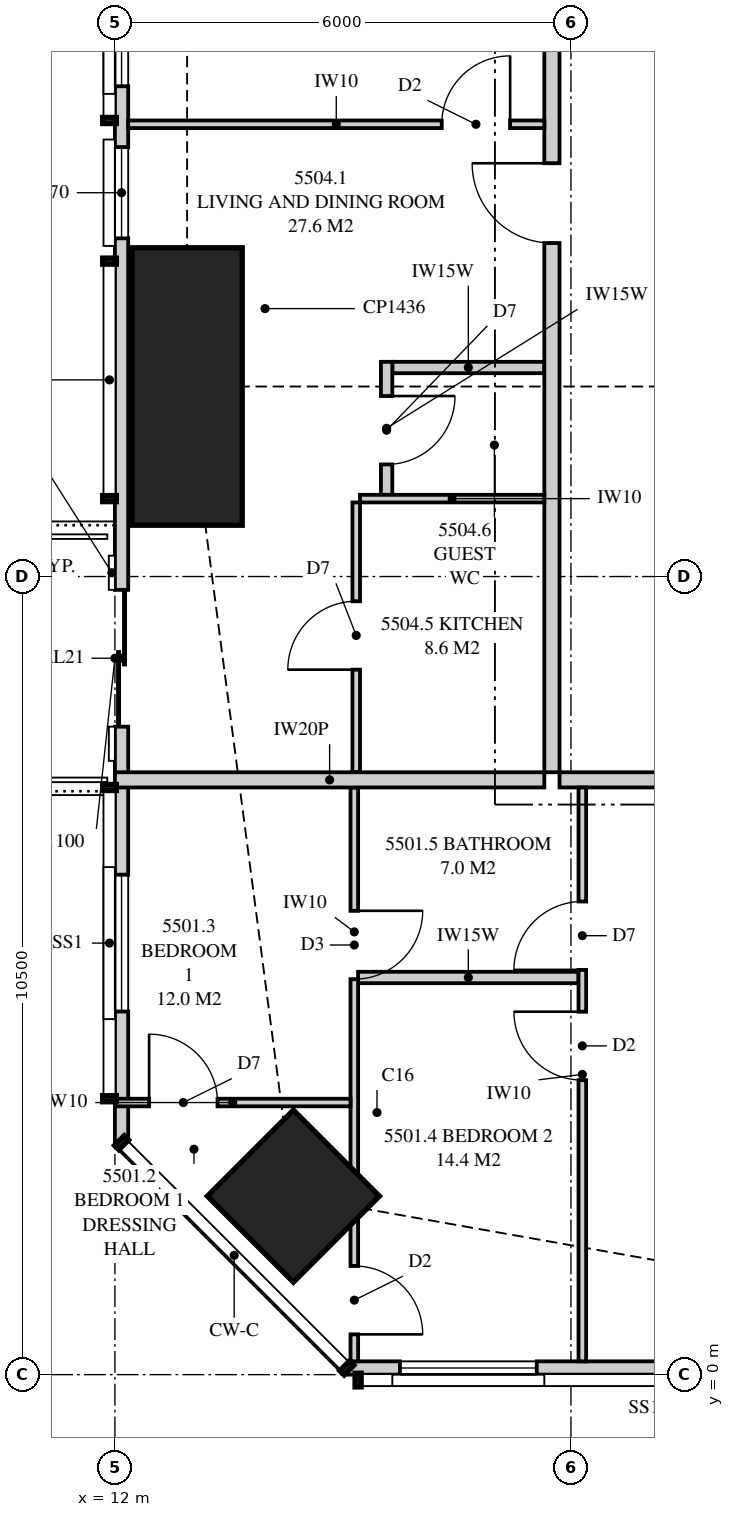
"""IFC4 building model, lengths in metres.
Left out: names, types, materials, properties, quantities, classifications, styles, units other than length and angle.
Written with IfcOpenShell. Run it as: python <this file> out.ifc"""

import sys

from ifc_helpers import new_model, si_unit, direction, frame, frame_2d, origin, origin_2d, place, context, subcontext, project, spatial, polyline, rectangle, outline, extrude, element, fill, save


model = new_model("IFC4")
c1 = context("Model", 3, precision=1e-05, world=origin(), true_north=direction((0.0, 1.0)))
c2 = subcontext(c1, "Body", "Model", "MODEL_VIEW")
j1 = project(units=[si_unit("LENGTHUNIT", "METRE"), si_unit("PLANEANGLEUNIT", "RADIAN")], contexts=[c1])
p1 = place(None, origin())
s1 = spatial("IfcSite", under=j1, at=p1, CompositionType="ELEMENT")
p2 = place(p1, origin())
s2 = spatial("IfcBuilding", under=s1, at=p2, CompositionType="ELEMENT")
p3 = place(p2, frame((0.0, 0.0, 201.25)))
s3 = spatial("IfcBuildingStorey", under=s2, at=p3, CompositionType="ELEMENT", Elevation=201.25)
p4 = place(p3, frame((14.348, 2.348, 0.0), z_axis=(0.0, 0.0, 1.0), x_axis=(0.707106781187, 0.707106781187, 0.0)))
e1 = element("IfcColumn", 1, at=p4, inside=s3, PredefinedType="COLUMN", context=c2, shape_type="SweptSolid", body=[
    extrude(rectangle(XDim=1.6, YDim=1.6, at=origin_2d()), origin(), (0.0, 0.0, 1.0), 3.35),
])
p5 = place(p3, frame((12.95, 13.0, 0.0), z_axis=(0.0, 0.0, 1.0), x_axis=(1.0, 0.0, 0.0)))
e2 = element("IfcColumn", 2, at=p5, inside=s3, PredefinedType="COLUMN", context=c2, shape_type="SweptSolid", body=[
    extrude(rectangle(XDim=1.45, YDim=3.65, at=origin_2d()), origin(), (0.0, 0.0, 1.0), 3.35),
])
p6 = place(p3, frame((15.051, 0.087, 0.0), z_axis=(0.0, 0.0, 1.0), x_axis=(1.0, 0.0, 0.0)))
e3 = element("IfcWall", 3, at=p6, inside=s3, PredefinedType="SOLIDWALL", context=c2, shape_type="SweptSolid", body=[
    extrude(outline(polyline([(0.0, 0.0), (34.897, 0.0), (34.897, 3.11), (27.91, 3.11), (27.91, 2.15), (27.836, 2.15), (27.836, 3.11), (27.699, 3.11), (27.699, 2.15), (7.199, 2.15), (7.199, 3.11), (7.062, 3.11), (7.062, 2.15), (6.987, 2.15), (6.987, 3.11), (0.0, 3.11), (0.0, 0.0)])), frame((0.0, 0.087, 0.0), z_axis=(0.0, -1.0, 0.0), x_axis=(1.0, 0.0, 0.0)), (0.0, 0.0, 1.0), 0.175),
])
p7 = place(p6, frame((0.699, 0.0, 0.4)))
e4 = element("IfcOpeningElement", 4, at=p7, cuts=e3, PredefinedType="OPENING", context=c2, shape_type="SweptSolid", body=[
    extrude(rectangle(XDim=1.8, YDim=1.7, at=frame_2d((0.9, 0.85))), frame((0.0, 0.097, 0.0), z_axis=(0.0, -1.0, 0.0), x_axis=(1.0, 0.0, 0.0)), (0.0, 0.0, 1.0), 0.195),
])
p8 = place(p6, frame((9.274, 0.0, 0.4)))
e5 = element("IfcOpeningElement", 5, at=p8, cuts=e3, PredefinedType="OPENING", context=c2, shape_type="SweptSolid", body=[
    extrude(rectangle(XDim=2.4, YDim=1.7, at=frame_2d((1.2, 0.85))), frame((0.0, 0.097, 0.0), z_axis=(0.0, -1.0, 0.0), x_axis=(1.0, 0.0, 0.0)), (0.0, 0.0, 1.0), 0.195),
])
p9 = place(p6, frame((13.561, 0.0, 0.0)))
e6 = element("IfcOpeningElement", 6, at=p9, cuts=e3, PredefinedType="OPENING", context=c2, shape_type="SweptSolid", body=[
    extrude(rectangle(XDim=1.8, YDim=2.1, at=frame_2d((0.9, 1.05))), frame((0.0, 0.097, 0.0), z_axis=(0.0, -1.0, 0.0), x_axis=(1.0, 0.0, 0.0)), (0.0, 0.0, 1.0), 0.195),
])
p10 = place(p6, frame((20.049, 0.0, 0.4)))
e7 = element("IfcOpeningElement", 7, at=p10, cuts=e3, PredefinedType="OPENING", context=c2, shape_type="SweptSolid", body=[
    extrude(rectangle(XDim=1.8, YDim=1.7, at=frame_2d((0.9, 0.85))), frame((0.0, 0.097, 0.0), z_axis=(0.0, -1.0, 0.0), x_axis=(1.0, 0.0, 0.0)), (0.0, 0.0, 1.0), 0.195),
])
p11 = place(p6, frame((23.649, 0.0, 0.4)))
e8 = element("IfcOpeningElement", 8, at=p11, cuts=e3, PredefinedType="OPENING", context=c2, shape_type="SweptSolid", body=[
    extrude(rectangle(XDim=1.8, YDim=1.7, at=frame_2d((0.9, 0.85))), frame((0.0, 0.097, 0.0), z_axis=(0.0, -1.0, 0.0), x_axis=(1.0, 0.0, 0.0)), (0.0, 0.0, 1.0), 0.195),
])
p12 = place(p6, frame((29.625, 0.0, 0.4)))
e9 = element("IfcOpeningElement", 9, at=p12, cuts=e3, PredefinedType="OPENING", context=c2, shape_type="SweptSolid", body=[
    extrude(rectangle(XDim=1.8, YDim=1.7, at=frame_2d((0.9, 0.85))), frame((0.0, 0.097, 0.0), z_axis=(0.0, -1.0, 0.0), x_axis=(1.0, 0.0, 0.0)), (0.0, 0.0, 1.0), 0.195),
])
p13 = place(p6, frame((32.51, 0.0, 0.4)))
e10 = element("IfcOpeningElement", 10, at=p13, cuts=e3, PredefinedType="OPENING", context=c2, shape_type="SweptSolid", body=[
    extrude(rectangle(XDim=1.8, YDim=1.7, at=frame_2d((0.9, 0.85))), frame((0.0, 0.097, 0.0), z_axis=(0.0, -1.0, 0.0), x_axis=(1.0, 0.0, 0.0)), (0.0, 0.0, 1.0), 0.195),
])
p14 = place(p3, frame((12.087, 32.949, 0.0), z_axis=(0.0, 0.0, 1.0), x_axis=(0.0, -1.0, 0.0)))
e11 = element("IfcWall", 11, at=p14, inside=s3, PredefinedType="SOLIDWALL", context=c2, shape_type="SweptSolid", body=[
    extrude(outline(polyline([(0.0, 0.0), (29.897, 0.0), (29.897, 3.11), (20.191, 3.11), (20.191, 2.15), (20.051, 2.15), (20.051, 3.11), (19.949, 3.11), (19.949, 2.15), (7.949, 2.15), (7.949, 3.11), (7.823, 3.11), (7.823, 2.15), (7.73, 2.15), (7.73, 3.11), (0.0, 3.11), (0.0, 0.0)])), frame((0.0, 0.087, 0.0), z_axis=(0.0, -1.0, 0.0), x_axis=(1.0, 0.0, 0.0)), (0.0, 0.0, 1.0), 0.175),
])
p15 = place(p14, frame((1.226, 0.0, 0.4)))
e12 = element("IfcOpeningElement", 12, at=p15, cuts=e11, PredefinedType="OPENING", context=c2, shape_type="SweptSolid", body=[
    extrude(rectangle(XDim=1.8, YDim=1.7, at=frame_2d((0.9, 0.85))), frame((0.0, 0.097, 0.0), z_axis=(0.0, -1.0, 0.0), x_axis=(1.0, 0.0, 0.0)), (0.0, 0.0, 1.0), 0.195),
])
p16 = place(p14, frame((4.224, 0.0, 0.4)))
e13 = element("IfcOpeningElement", 13, at=p16, cuts=e11, PredefinedType="OPENING", context=c2, shape_type="SweptSolid", body=[
    extrude(rectangle(XDim=1.8, YDim=1.7, at=frame_2d((0.9, 0.85))), frame((0.0, 0.097, 0.0), z_axis=(0.0, -1.0, 0.0), x_axis=(1.0, 0.0, 0.0)), (0.0, 0.0, 1.0), 0.195),
])
p17 = place(p14, frame((10.974, 0.0, 0.4)))
e14 = element("IfcOpeningElement", 14, at=p17, cuts=e11, PredefinedType="OPENING", context=c2, shape_type="SweptSolid", body=[
    extrude(rectangle(XDim=1.8, YDim=1.7, at=frame_2d((0.9, 0.85))), frame((0.0, 0.097, 0.0), z_axis=(0.0, -1.0, 0.0), x_axis=(1.0, 0.0, 0.0)), (0.0, 0.0, 1.0), 0.195),
])
p18 = place(p14, frame((14.199, 0.0, 0.4)))
e15 = element("IfcOpeningElement", 15, at=p18, cuts=e11, PredefinedType="OPENING", context=c2, shape_type="SweptSolid", body=[
    extrude(rectangle(XDim=1.8, YDim=1.7, at=frame_2d((0.9, 0.85))), frame((0.0, 0.097, 0.0), z_axis=(0.0, -1.0, 0.0), x_axis=(1.0, 0.0, 0.0)), (0.0, 0.0, 1.0), 0.195),
])
p19 = place(p14, frame((22.624, 0.0, 0.0)))
e16 = element("IfcOpeningElement", 16, at=p19, cuts=e11, PredefinedType="OPENING", context=c2, shape_type="SweptSolid", body=[
    extrude(rectangle(XDim=1.8, YDim=2.1, at=frame_2d((0.9, 1.05))), frame((0.0, 0.097, 0.0), z_axis=(0.0, -1.0, 0.0), x_axis=(1.0, 0.0, 0.0)), (0.0, 0.0, 1.0), 0.195),
])
p20 = place(p14, frame((16.799, 0.0, 0.4)))
e17 = element("IfcOpeningElement", 17, at=p20, cuts=e11, PredefinedType="OPENING", context=c2, shape_type="SweptSolid", body=[
    extrude(rectangle(XDim=1.2, YDim=1.7, at=frame_2d((0.6, 0.85))), frame((0.0, 0.097, 0.0), z_axis=(0.0, -1.0, 0.0), x_axis=(1.0, 0.0, 0.0)), (0.0, 0.0, 1.0), 0.195),
])
p21 = place(p14, frame((26.371, 0.0, 0.4)))
e18 = element("IfcOpeningElement", 18, at=p21, cuts=e11, PredefinedType="OPENING", context=c2, shape_type="SweptSolid", body=[
    extrude(rectangle(XDim=1.8, YDim=1.7, at=frame_2d((0.9, 0.85))), frame((0.0, 0.097, 0.0), z_axis=(0.0, -1.0, 0.0), x_axis=(1.0, 0.0, 0.0)), (0.0, 0.0, 1.0), 0.195),
])
p22 = place(p3, frame((17.85, 7.825, 0.0), z_axis=(0.0, 0.0, 1.0), x_axis=(1.0, 0.0, 0.0)))
e19 = element("IfcWall", 19, at=p22, inside=s3, PredefinedType="PARTITIONING", context=c2, shape_type="SweptSolid", body=[
    extrude(rectangle(XDim=3.85, YDim=0.2, at=frame_2d((1.925, 0.0))), origin(), (0.0, 0.0, 1.0), 3.11),
])
p23 = place(p3, frame((15.15, 0.175, 0.0), z_axis=(0.0, 0.0, 1.0), x_axis=(0.0, 1.0, 0.0)))
e20 = element("IfcWall", 20, at=p23, inside=s3, PredefinedType="PARTITIONING", context=c2, shape_type="SweptSolid", body=[
    extrude(outline(polyline([(0.0, 0.0), (7.55, 0.0), (7.55, 3.11), (2.905, 3.11), (2.905, 2.15), (1.158, 2.15), (1.158, 3.11), (0.0, 3.11), (0.0, 0.0)])), frame((0.0, 0.05, 0.0), z_axis=(0.0, -1.0, 0.0), x_axis=(1.0, 0.0, 0.0)), (0.0, 0.0, 1.0), 0.1),
])
p24 = place(p23, frame((0.355, 0.0, 0.0)))
e21 = element("IfcOpeningElement", 21, at=p24, cuts=e20, PredefinedType="OPENING", context=c2, shape_type="SweptSolid", body=[
    extrude(rectangle(XDim=0.9, YDim=2.1, at=frame_2d((0.45, 1.05))), frame((0.0, 0.06, 0.0), z_axis=(0.0, -1.0, 0.0), x_axis=(1.0, 0.0, 0.0)), (0.0, 0.0, 1.0), 0.12),
])
p25 = place(p23, frame((5.027, 0.0, 0.0)))
e22 = element("IfcOpeningElement", 22, at=p25, cuts=e20, PredefinedType="OPENING", context=c2, shape_type="SweptSolid", body=[
    extrude(rectangle(XDim=0.9, YDim=2.1, at=frame_2d((0.45, 1.05))), frame((0.0, 0.06, 0.0), z_axis=(0.0, -1.0, 0.0), x_axis=(1.0, 0.0, 0.0)), (0.0, 0.0, 1.0), 0.12),
])
p26 = place(p3, frame((18.15, 0.175, 0.0), z_axis=(0.0, 0.0, 1.0), x_axis=(0.0, 1.0, 0.0)))
e23 = element("IfcWall", 23, at=p26, inside=s3, PredefinedType="PARTITIONING", context=c2, shape_type="SweptSolid", body=[
    extrude(outline(polyline([(0.0, 0.0), (7.55, 0.0), (7.55, 3.11), (2.374, 3.11), (2.374, 2.15), (0.627, 2.15), (0.627, 3.11), (0.0, 3.11), (0.0, 0.0)])), frame((0.0, 0.05, 0.0), z_axis=(0.0, -1.0, 0.0), x_axis=(1.0, 0.0, 0.0)), (0.0, 0.0, 1.0), 0.1),
])
p27 = place(p26, frame((3.7, 0.0, 0.0)))
e24 = element("IfcOpeningElement", 24, at=p27, cuts=e23, PredefinedType="OPENING", context=c2, shape_type="SweptSolid", body=[
    extrude(rectangle(XDim=0.9, YDim=2.1, at=frame_2d((0.45, 1.05))), frame((0.0, 0.06, 0.0), z_axis=(0.0, -1.0, 0.0), x_axis=(1.0, 0.0, 0.0)), (0.0, 0.0, 1.0), 0.12),
])
p28 = place(p26, frame((5.15, 0.0, 0.0)))
e25 = element("IfcOpeningElement", 25, at=p28, cuts=e23, PredefinedType="OPENING", context=c2, shape_type="SweptSolid", body=[
    extrude(rectangle(XDim=0.9, YDim=2.1, at=frame_2d((0.45, 1.05))), frame((0.0, 0.06, 0.0), z_axis=(0.0, -1.0, 0.0), x_axis=(1.0, 0.0, 0.0)), (0.0, 0.0, 1.0), 0.12),
])
p29 = place(p3, frame((12.0, 3.58, 0.0), z_axis=(0.0, 0.0, 1.0), x_axis=(1.0, 0.0, 0.0)))
e26 = element("IfcWall", 26, at=p29, inside=s3, PredefinedType="PARTITIONING", context=c2, shape_type="SweptSolid", body=[
    extrude(outline(polyline([(0.0, 0.0), (3.1, 0.0), (3.1, 3.11), (3.054, 3.11), (3.054, 2.15), (1.319, 2.15), (1.319, 3.11), (0.0, 3.11), (0.0, 0.0)])), frame((0.0, 0.05, 0.0), z_axis=(0.0, -1.0, 0.0), x_axis=(1.0, 0.0, 0.0)), (0.0, 0.0, 1.0), 0.1),
])
p30 = place(p29, frame((0.45, 0.0, 0.0)))
e27 = element("IfcOpeningElement", 27, at=p30, cuts=e26, PredefinedType="OPENING", context=c2, shape_type="SweptSolid", body=[
    extrude(rectangle(XDim=0.9, YDim=2.1, at=frame_2d((0.45, 1.05))), frame((0.0, 0.06, 0.0), z_axis=(0.0, -1.0, 0.0), x_axis=(1.0, 0.0, 0.0)), (0.0, 0.0, 1.0), 0.12),
])
p31 = place(p3, frame((15.2, 5.225, 0.0), z_axis=(0.0, 0.0, 1.0), x_axis=(1.0, 0.0, 0.0)))
e28 = element("IfcWall", 28, at=p31, inside=s3, PredefinedType="PLUMBINGWALL", context=c2, shape_type="SweptSolid", body=[
    extrude(rectangle(XDim=2.9, YDim=0.15, at=frame_2d((1.45, 0.0))), origin(), (0.0, 0.0, 1.0), 3.11),
])
p32 = place(p3, frame((12.0, 7.825, 0.0), z_axis=(0.0, 0.0, 1.0), x_axis=(1.0, 0.0, 0.0)))
e29 = element("IfcWall", 29, at=p32, inside=s3, PredefinedType="PARTITIONING", context=c2, shape_type="SweptSolid", body=[
    extrude(outline(polyline([(0.0, 0.0), (5.65, 0.0), (5.65, 3.11), (2.547, 3.11), (2.547, 2.15), (0.712, 2.15), (0.712, 3.11), (0.0, 3.11), (0.0, 0.0)])), frame((0.0, 0.1, 0.0), z_axis=(0.0, -1.0, 0.0), x_axis=(1.0, 0.0, 0.0)), (0.0, 0.0, 1.0), 0.2),
])
p33 = place(p3, frame((17.75, 7.925, 0.0), z_axis=(0.0, 0.0, 1.0), x_axis=(0.0, 1.0, 0.0)))
e30 = element("IfcWall", 30, at=p33, inside=s3, PredefinedType="PARTITIONING", context=c2, shape_type="SweptSolid", body=[
    extrude(outline(polyline([(0.0, 0.0), (14.925, 0.0), (14.925, 3.11), (5.412, 3.11), (5.412, 2.541), (4.738, 2.541), (4.738, 3.11), (0.0, 3.11), (0.0, 0.0)])), frame((0.0, 0.1, 0.0), z_axis=(0.0, -1.0, 0.0), x_axis=(1.0, 0.0, 0.0)), (0.0, 0.0, 1.0), 0.2),
])
p34 = place(p33, frame((6.962, 0.0, 0.0)))
e31 = element("IfcOpeningElement", 31, at=p34, cuts=e30, PredefinedType="OPENING", context=c2, shape_type="SweptSolid", body=[
    extrude(rectangle(XDim=1.05, YDim=2.2, at=frame_2d((0.525, 1.1))), frame((0.0, 0.11, 0.0), z_axis=(0.0, -1.0, 0.0), x_axis=(1.0, 0.0, 0.0)), (0.0, 0.0, 1.0), 0.22),
])
p35 = place(p3, frame((12.175, 16.45, 0.0), z_axis=(0.0, 0.0, 1.0), x_axis=(1.0, 0.0, 0.0)))
e32 = element("IfcWall", 32, at=p35, inside=s3, PredefinedType="PARTITIONING", context=c2, shape_type="SweptSolid", body=[
    extrude(outline(polyline([(0.0, 0.0), (5.475, 0.0), (5.475, 3.11), (1.635, 3.11), (1.635, 2.15), (0.0, 2.15), (0.0, 3.11), (0.0, 0.0)])), frame((0.0, 0.05, 0.0), z_axis=(0.0, -1.0, 0.0), x_axis=(1.0, 0.0, 0.0)), (0.0, 0.0, 1.0), 0.1),
])
p36 = place(p35, frame((4.125, 0.0, 0.0)))
e33 = element("IfcOpeningElement", 33, at=p36, cuts=e32, PredefinedType="OPENING", context=c2, shape_type="SweptSolid", body=[
    extrude(rectangle(XDim=0.9, YDim=2.1, at=frame_2d((0.45, 1.05))), frame((0.0, 0.06, 0.0), z_axis=(0.0, -1.0, 0.0), x_axis=(1.0, 0.0, 0.0)), (0.0, 0.0, 1.0), 0.12),
])
p37 = place(p3, frame((15.175, 7.925, 0.0), z_axis=(0.0, 0.0, 1.0), x_axis=(0.0, 1.0, 0.0)))
e34 = element("IfcWall", 34, at=p37, inside=s3, PredefinedType="PARTITIONING", context=c2, shape_type="SweptSolid", body=[
    extrude(rectangle(XDim=3.55, YDim=0.1, at=frame_2d((1.775, 0.0))), origin(), (0.0, 0.0, 1.0), 3.11),
])
p38 = place(p37, frame((1.35, 0.0, 0.0)))
e35 = element("IfcOpeningElement", 35, at=p38, cuts=e34, PredefinedType="OPENING", context=c2, shape_type="SweptSolid", body=[
    extrude(rectangle(XDim=0.9, YDim=2.1, at=frame_2d((0.45, 1.05))), frame((0.0, 0.06, 0.0), z_axis=(0.0, -1.0, 0.0), x_axis=(1.0, 0.0, 0.0)), (0.0, 0.0, 1.0), 0.12),
])
p39 = place(p3, frame((15.225, 11.525, 0.0), z_axis=(0.0, 0.0, 1.0), x_axis=(1.0, 0.0, 0.0)))
e36 = element("IfcWall", 36, at=p39, inside=s3, PredefinedType="PARTITIONING", context=c2, shape_type="SweptSolid", body=[
    extrude(rectangle(XDim=2.425, YDim=0.1, at=frame_2d((1.212, 0.0))), origin(), (0.0, 0.0, 1.0), 3.11),
])
p40 = place(p3, frame((15.575, 11.575, 0.0), z_axis=(0.0, 0.0, 1.0), x_axis=(0.0, 1.0, 0.0)))
e37 = element("IfcWall", 37, at=p40, inside=s3, PredefinedType="PLUMBINGWALL", context=c2, shape_type="SweptSolid", body=[
    extrude(outline(polyline([(0.0, 0.0), (1.75, 0.0), (1.75, 3.11), (1.737, 3.11), (1.737, 2.541), (1.113, 2.541), (1.113, 3.11), (0.0, 3.11), (0.0, 0.0)])), frame((0.0, 0.075, 0.0), z_axis=(0.0, -1.0, 0.0), x_axis=(1.0, 0.0, 0.0)), (0.0, 0.0, 1.0), 0.15),
])
p41 = place(p40, frame((0.4, 0.0, 0.0)))
e38 = element("IfcOpeningElement", 38, at=p41, cuts=e37, PredefinedType="OPENING", context=c2, shape_type="SweptSolid", body=[
    extrude(rectangle(XDim=0.9, YDim=2.1, at=frame_2d((0.45, 1.05))), frame((0.0, 0.085, 0.0), z_axis=(0.0, -1.0, 0.0), x_axis=(1.0, 0.0, 0.0)), (0.0, 0.0, 1.0), 0.17),
])
p42 = place(p3, frame((17.65, 13.25, 0.0), z_axis=(0.0, 0.0, 1.0), x_axis=(-1.0, 0.0, 0.0)))
e39 = element("IfcWall", 39, at=p42, inside=s3, PredefinedType="PLUMBINGWALL", context=c2, shape_type="SweptSolid", body=[
    extrude(outline(polyline([(0.0, 0.0), (2.0, 0.0), (2.0, 3.11), (2.0, 2.541), (0.0, 2.541), (0.0, 3.11), (0.0, 0.0)])), frame((0.0, 0.075, 0.0), z_axis=(0.0, -1.0, 0.0), x_axis=(1.0, 0.0, 0.0)), (0.0, 0.0, 1.0), 0.15),
])
p43 = place(p7, origin())
e40 = element("IfcWindow", 40, at=p43, inside=s3, PartitioningType="SINGLE_PANEL", PredefinedType="WINDOW", context=c2, shape_type="SweptSolid", body=[
    extrude(rectangle(XDim=1.8, YDim=1.7, at=frame_2d((0.9, 0.85))), frame((0.0, 0.03, 0.0), z_axis=(0.0, -1.0, 0.0), x_axis=(1.0, 0.0, 0.0)), (0.0, 0.0, 1.0), 0.06),
])
fill(e4, e40)
p44 = place(p18, origin())
e41 = element("IfcWindow", 41, at=p44, inside=s3, PartitioningType="SINGLE_PANEL", PredefinedType="WINDOW", context=c2, shape_type="SweptSolid", body=[
    extrude(rectangle(XDim=1.8, YDim=1.7, at=frame_2d((0.9, 0.85))), frame((0.0, 0.03, 0.0), z_axis=(0.0, -1.0, 0.0), x_axis=(1.0, 0.0, 0.0)), (0.0, 0.0, 1.0), 0.06),
])
fill(e15, e41)
p45 = place(p19, origin())
e42 = element("IfcDoor", 42, at=p45, inside=s3, OperationType="SLIDING_TO_LEFT", PredefinedType="DOOR", context=c2, shape_type="SweptSolid", body=[
    extrude(rectangle(XDim=1.8, YDim=2.1, at=frame_2d((0.9, 1.05))), frame((0.0, 0.025, 0.0), z_axis=(0.0, -1.0, 0.0), x_axis=(1.0, 0.0, 0.0)), (0.0, 0.0, 1.0), 0.05),
])
fill(e16, e42)
p46 = place(p20, origin())
e43 = element("IfcWindow", 43, at=p46, inside=s3, PartitioningType="SINGLE_PANEL", PredefinedType="WINDOW", context=c2, shape_type="SweptSolid", body=[
    extrude(rectangle(XDim=1.2, YDim=1.7, at=frame_2d((0.6, 0.85))), frame((0.0, 0.03, 0.0), z_axis=(0.0, -1.0, 0.0), x_axis=(1.0, 0.0, 0.0)), (0.0, 0.0, 1.0), 0.06),
])
fill(e17, e43)
p47 = place(p21, origin())
e44 = element("IfcWindow", 44, at=p47, inside=s3, PartitioningType="SINGLE_PANEL", PredefinedType="WINDOW", context=c2, shape_type="SweptSolid", body=[
    extrude(rectangle(XDim=1.8, YDim=1.7, at=frame_2d((0.9, 0.85))), frame((0.0, 0.03, 0.0), z_axis=(0.0, -1.0, 0.0), x_axis=(1.0, 0.0, 0.0)), (0.0, 0.0, 1.0), 0.06),
])
fill(e18, e44)
p48 = place(p30, origin())
e45 = element("IfcDoor", 45, at=p48, inside=s3, OperationType="SINGLE_SWING_LEFT", PredefinedType="DOOR", context=c2, shape_type="SweptSolid", body=[
    extrude(rectangle(XDim=0.9, YDim=2.1, at=frame_2d((0.45, 1.05))), frame((0.0, 0.025, 0.0), z_axis=(0.0, -1.0, 0.0), x_axis=(1.0, 0.0, 0.0)), (0.0, 0.0, 1.0), 0.05),
])
fill(e27, e45)
p49 = place(p24, frame((0.9, 0.0, 0.0), z_axis=(0.0, 0.0, 1.0), x_axis=(-1.0, 0.0, 0.0)))
e46 = element("IfcDoor", 46, at=p49, inside=s3, OperationType="SINGLE_SWING_RIGHT", PredefinedType="DOOR", context=c2, shape_type="SweptSolid", body=[
    extrude(rectangle(XDim=0.9, YDim=2.1, at=frame_2d((0.45, 1.05))), frame((0.0, 0.025, 0.0), z_axis=(0.0, -1.0, 0.0), x_axis=(1.0, 0.0, 0.0)), (0.0, 0.0, 1.0), 0.05),
])
fill(e21, e46)
p50 = place(p27, origin())
e47 = element("IfcDoor", 47, at=p50, inside=s3, OperationType="SINGLE_SWING_RIGHT", PredefinedType="DOOR", context=c2, shape_type="SweptSolid", body=[
    extrude(rectangle(XDim=0.9, YDim=2.1, at=frame_2d((0.45, 1.05))), frame((0.0, 0.025, 0.0), z_axis=(0.0, -1.0, 0.0), x_axis=(1.0, 0.0, 0.0)), (0.0, 0.0, 1.0), 0.05),
])
fill(e24, e47)
p51 = place(p28, origin())
e48 = element("IfcDoor", 48, at=p51, inside=s3, OperationType="SINGLE_SWING_LEFT", PredefinedType="DOOR", context=c2, shape_type="SweptSolid", body=[
    extrude(rectangle(XDim=0.9, YDim=2.1, at=frame_2d((0.45, 1.05))), frame((0.0, 0.025, 0.0), z_axis=(0.0, -1.0, 0.0), x_axis=(1.0, 0.0, 0.0)), (0.0, 0.0, 1.0), 0.05),
])
fill(e25, e48)
p52 = place(p25, frame((0.9, 0.0, 0.0), z_axis=(0.0, 0.0, 1.0), x_axis=(-1.0, 0.0, 0.0)))
e49 = element("IfcDoor", 49, at=p52, inside=s3, OperationType="SINGLE_SWING_LEFT", PredefinedType="DOOR", context=c2, shape_type="SweptSolid", body=[
    extrude(rectangle(XDim=0.9, YDim=2.1, at=frame_2d((0.45, 1.05))), frame((0.0, 0.025, 0.0), z_axis=(0.0, -1.0, 0.0), x_axis=(1.0, 0.0, 0.0)), (0.0, 0.0, 1.0), 0.05),
])
fill(e22, e49)
p53 = place(p34, origin())
e50 = element("IfcDoor", 50, at=p53, inside=s3, OperationType="SINGLE_SWING_RIGHT", PredefinedType="DOOR", context=c2, shape_type="SweptSolid", body=[
    extrude(rectangle(XDim=1.05, YDim=2.2, at=frame_2d((0.525, 1.1))), frame((0.0, 0.025, 0.0), z_axis=(0.0, -1.0, 0.0), x_axis=(1.0, 0.0, 0.0)), (0.0, 0.0, 1.0), 0.05),
])
fill(e31, e50)
p54 = place(p36, origin())
e51 = element("IfcDoor", 51, at=p54, inside=s3, OperationType="SINGLE_SWING_RIGHT", PredefinedType="DOOR", context=c2, shape_type="SweptSolid", body=[
    extrude(rectangle(XDim=0.9, YDim=2.1, at=frame_2d((0.45, 1.05))), frame((0.0, 0.025, 0.0), z_axis=(0.0, -1.0, 0.0), x_axis=(1.0, 0.0, 0.0)), (0.0, 0.0, 1.0), 0.05),
])
fill(e33, e51)
p55 = place(p38, origin())
e52 = element("IfcDoor", 52, at=p55, inside=s3, OperationType="SINGLE_SWING_LEFT", PredefinedType="DOOR", context=c2, shape_type="SweptSolid", body=[
    extrude(rectangle(XDim=0.9, YDim=2.1, at=frame_2d((0.45, 1.05))), frame((0.0, 0.025, 0.0), z_axis=(0.0, -1.0, 0.0), x_axis=(1.0, 0.0, 0.0)), (0.0, 0.0, 1.0), 0.05),
])
fill(e35, e52)
p56 = place(p41, frame((0.9, 0.0, 0.0), z_axis=(0.0, 0.0, 1.0), x_axis=(-1.0, 0.0, 0.0)))
e53 = element("IfcDoor", 53, at=p56, inside=s3, OperationType="SINGLE_SWING_LEFT", PredefinedType="DOOR", context=c2, shape_type="SweptSolid", body=[
    extrude(rectangle(XDim=0.9, YDim=2.1, at=frame_2d((0.45, 1.05))), frame((0.0, 0.025, 0.0), z_axis=(0.0, -1.0, 0.0), x_axis=(1.0, 0.0, 0.0)), (0.0, 0.0, 1.0), 0.05),
])
fill(e38, e53)
save(model, sys.argv[1])
